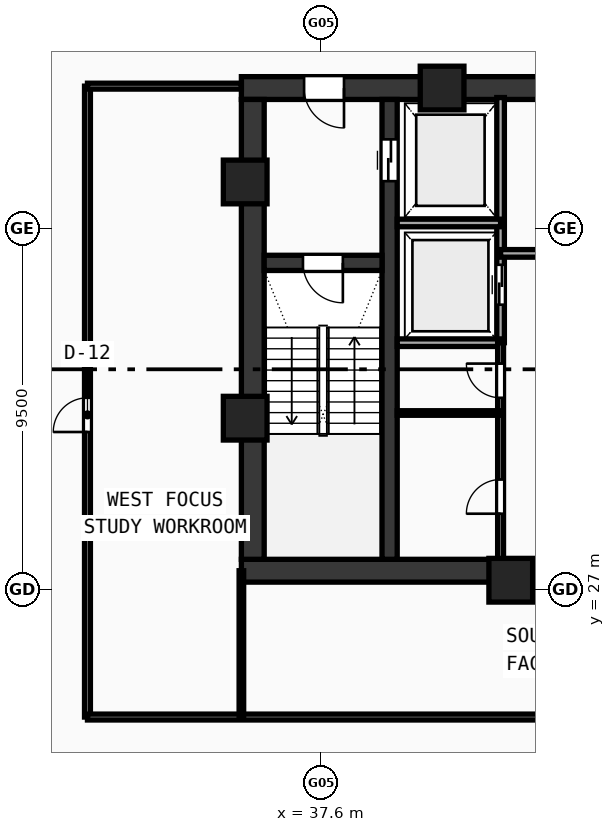
"""IFC4 building model, lengths in metres.
Left out: names, types, materials, properties, quantities, classifications, styles, units other than length and angle.
Written with IfcOpenShell. Run it as: python <this file> out.ifc"""

import sys

from ifc_helpers import new_model, si_unit, direction, frame, frame_2d, origin, origin_with_axes, origin_2d, place, context, subcontext, project, spatial, rectangle, hollow_rectangle, extrude, source, transform, mapped, element, fill, save


model = new_model("IFC4")
c1 = context("Model", 3, precision=1e-05, world=origin(), true_north=direction((0.0, 1.0)))
c2 = subcontext(c1, "Body", "Model", "MODEL_VIEW")
j1 = project(units=[si_unit("LENGTHUNIT", "METRE"), si_unit("PLANEANGLEUNIT", "RADIAN")], contexts=[c1])
p1 = place(None, origin())
s1 = spatial("IfcSite", under=j1, at=p1, CompositionType="ELEMENT")
p2 = place(p1, origin())
s2 = spatial("IfcBuilding", under=s1, at=p2, CompositionType="ELEMENT")
p3 = place(p2, frame((0.0, 0.0, 155.59)))
s3 = spatial("IfcBuildingStorey", under=s2, at=p3, CompositionType="ELEMENT", Elevation=155.59)
p4 = place(p3, frame((35.5, 27.5, 0.0), z_axis=(0.0, 0.0, 1.0), x_axis=(1.0, 0.0, 0.0)))
e1 = element("IfcWall", 1, at=p4, inside=s3, PredefinedType="SHEAR", context=c2, shape_type="SweptSolid", body=[
    extrude(rectangle(XDim=25.0, YDim=0.6, at=frame_2d((12.5, 0.0))), origin(), (0.0, 0.0, 1.0), 3.42),
])
p5 = place(p3, frame((35.5, 40.2, 0.0), z_axis=(0.0, 0.0, 1.0), x_axis=(1.0, 0.0, 0.0)))
e2 = element("IfcWall", 2, at=p5, inside=s3, PredefinedType="SHEAR", context=c2, shape_type="SweptSolid", body=[
    extrude(rectangle(XDim=11.3, YDim=0.6, at=frame_2d((5.65, 0.0))), origin(), (0.0, 0.0, 1.0), 3.42),
])
p6 = place(p5, frame((1.65, 0.0, 0.0)))
e3 = element("IfcOpeningElement", 3, at=p6, cuts=e2, PredefinedType="OPENING", context=c2, shape_type="SweptSolid", body=[
    extrude(rectangle(XDim=1.05, YDim=2.1, at=frame_2d((0.525, 1.05))), frame((0.0, 0.31, 0.0), z_axis=(0.0, -1.0, 0.0), x_axis=(1.0, 0.0, 0.0)), (0.0, 0.0, 1.0), 0.62),
])
p7 = place(p3, frame((35.8, 27.8, 0.0), z_axis=(0.0, 0.0, 1.0), x_axis=(0.0, 1.0, 0.0)))
e4 = element("IfcWall", 4, at=p7, inside=s3, PredefinedType="SHEAR", context=c2, shape_type="SweptSolid", body=[
    extrude(rectangle(XDim=12.1, YDim=0.6, at=frame_2d((6.05, 0.0))), origin(), (0.0, 0.0, 1.0), 3.42),
])
p8 = place(p3, frame((39.4, 27.8, 0.0), z_axis=(0.0, 0.0, 1.0), x_axis=(0.0, 1.0, 0.0)))
e5 = element("IfcWall", 5, at=p8, inside=s3, PredefinedType="SHEAR", context=c2, shape_type="SweptSolid", body=[
    extrude(rectangle(XDim=12.1, YDim=0.4, at=frame_2d((6.05, 0.0))), origin(), (0.0, 0.0, 1.0), 3.42),
])
p9 = place(p8, frame((9.95, 0.0, 0.0)))
e6 = element("IfcOpeningElement", 6, at=p9, cuts=e5, PredefinedType="OPENING", context=c2, shape_type="SweptSolid", body=[
    extrude(rectangle(XDim=1.1, YDim=2.1, at=frame_2d((0.55, 1.05))), frame((0.0, 0.21, 0.0), z_axis=(0.0, -1.0, 0.0), x_axis=(1.0, 0.0, 0.0)), (0.0, 0.0, 1.0), 0.42),
])
p10 = place(p3, frame((36.1, 35.6, 0.0), z_axis=(0.0, 0.0, 1.0), x_axis=(1.0, 0.0, 0.0)))
e7 = element("IfcWall", 7, at=p10, inside=s3, PredefinedType="SHEAR", context=c2, shape_type="SweptSolid", body=[
    extrude(rectangle(XDim=3.1, YDim=0.4, at=frame_2d((1.55, 0.0))), origin(), (0.0, 0.0, 1.0), 3.42),
])
p11 = place(p10, frame((1.02, 0.0, 0.0)))
e8 = element("IfcOpeningElement", 8, at=p11, cuts=e7, PredefinedType="OPENING", context=c2, shape_type="SweptSolid", body=[
    extrude(rectangle(XDim=1.05, YDim=2.1, at=frame_2d((0.525, 1.05))), frame((0.0, 0.21, 0.0), z_axis=(0.0, -1.0, 0.0), x_axis=(1.0, 0.0, 0.0)), (0.0, 0.0, 1.0), 0.42),
])
m1 = source(origin(), c2, "Body", "SweptSolid", [
    extrude(hollow_rectangle(XDim=1.15, YDim=1.15, WallThickness=0.048, at=origin_2d()), origin(), (0.0, 0.0, 1.0), 3.68),
])
for number, where, z_axis, x_axis in (
    (9, (42.588, 27.25, -0.26), (0.0, 0.0, 1.0), (1.0, 0.0, 0.0)),
    (10, (40.781, 40.2, -0.26), (0.0, 0.0, 1.0), (1.0, 0.0, 0.0)),
    (11, (35.6, 37.729, -0.26), (0.0, 0.0, 1.0), (1.0, 0.0, 0.0)),
    (12, (35.6, 31.513, -0.26), (0.0, 0.0, 1.0), (1.0, 0.0, 0.0)),
):
    element("IfcColumn", number, at=place(p3, frame(where, z_axis=z_axis, x_axis=x_axis)), inside=s3, PredefinedType="COLUMN", context=c2, shape_type="MappedRepresentation", body=[
        mapped(m1, transform((0.0, 0.0, 0.0), scale=1.0)),
    ])
p12 = place(p3, frame((42.32, 33.5, 0.0), z_axis=(0.0, 0.0, 1.0), x_axis=(0.0, 1.0, 0.0)))
e13 = element("IfcWall", 13, at=p12, inside=s3, PredefinedType="SOLIDWALL", context=c2, shape_type="SweptSolid", body=[
    extrude(rectangle(XDim=6.45, YDim=0.2, at=frame_2d((3.225, 0.0))), origin(), (0.0, 0.0, 1.0), 3.42),
])
p13 = place(p12, frame((1.0, 0.0, 0.0)))
e14 = element("IfcOpeningElement", 14, at=p13, cuts=e13, PredefinedType="OPENING", context=c2, shape_type="SweptSolid", body=[
    extrude(rectangle(XDim=1.05, YDim=2.1, at=frame_2d((0.525, 1.05))), frame((0.0, 0.11, 0.0), z_axis=(0.0, -1.0, 0.0), x_axis=(1.0, 0.0, 0.0)), (0.0, 0.0, 1.0), 0.22),
])
for number, where, z_axis, x_axis in (
    (15, (39.6, 36.65, 0.0), (0.0, 0.0, 1.0), (1.0, 0.0, 0.0)),
    (16, (39.6, 33.5, 0.0), (0.0, 0.0, 1.0), (1.0, 0.0, 0.0)),
):
    element("IfcWall", number, at=place(p3, frame(where, z_axis=z_axis, x_axis=x_axis)), inside=s3, PredefinedType="SOLIDWALL", context=c2, shape_type="SweptSolid", body=[
        extrude(rectangle(XDim=2.72, YDim=0.2, at=frame_2d((1.36, 0.0))), origin(), (0.0, 0.0, 1.0), 3.42),
    ])
p14 = place(p3, frame((42.32, 35.85, 0.0), z_axis=(0.0, 0.0, 1.0), x_axis=(1.0, 0.0, 0.0)))
e17 = element("IfcWall", 17, at=p14, inside=s3, PredefinedType="SOLIDWALL", context=c2, shape_type="SweptSolid", body=[
    extrude(rectangle(XDim=4.73, YDim=0.2, at=frame_2d((2.365, 0.0))), origin(), (0.0, 0.0, 1.0), 3.42),
])
p15 = place(p14, frame((1.8, 0.0, 0.0)))
e18 = element("IfcOpeningElement", 18, at=p15, cuts=e17, PredefinedType="OPENING", context=c2, shape_type="SweptSolid", body=[
    extrude(rectangle(XDim=0.9, YDim=2.1, at=frame_2d((0.45, 1.05))), frame((0.0, 0.11, 0.0), z_axis=(0.0, -1.0, 0.0), x_axis=(1.0, 0.0, 0.0)), (0.0, 0.0, 1.0), 0.22),
])
p16 = place(p3, frame((42.32, 27.6, 0.0), z_axis=(0.0, 0.0, 1.0), x_axis=(0.0, 1.0, 0.0)))
e19 = element("IfcWall", 19, at=p16, inside=s3, PredefinedType="PARTITIONING", context=c2, shape_type="SweptSolid", body=[
    extrude(rectangle(XDim=5.9, YDim=0.155, at=frame_2d((2.95, 0.0))), origin(), (0.0, 0.0, 1.0), 3.42),
])
p17 = place(p16, frame((1.4, 0.0, 0.0)))
e20 = element("IfcOpeningElement", 20, at=p17, cuts=e19, PredefinedType="OPENING", context=c2, shape_type="SweptSolid", body=[
    extrude(rectangle(XDim=0.9, YDim=2.1, at=frame_2d((0.45, 1.05))), frame((0.0, 0.087, 0.0), z_axis=(0.0, -1.0, 0.0), x_axis=(1.0, 0.0, 0.0)), (0.0, 0.0, 1.0), 0.175),
])
p18 = place(p16, frame((4.45, 0.0, 0.0)))
e21 = element("IfcOpeningElement", 21, at=p18, cuts=e19, PredefinedType="OPENING", context=c2, shape_type="SweptSolid", body=[
    extrude(rectangle(XDim=0.9, YDim=2.1, at=frame_2d((0.45, 1.05))), frame((0.0, 0.087, 0.0), z_axis=(0.0, -1.0, 0.0), x_axis=(1.0, 0.0, 0.0)), (0.0, 0.0, 1.0), 0.175),
])
p19 = place(p3, frame((39.6, 31.65, 0.0), z_axis=(0.0, 0.0, 1.0), x_axis=(1.0, 0.0, 0.0)))
e22 = element("IfcWall", 22, at=p19, inside=s3, PredefinedType="PARTITIONING", context=c2, shape_type="SweptSolid", body=[
    extrude(rectangle(XDim=2.72, YDim=0.12, at=frame_2d((1.36, 0.0))), origin(), (0.0, 0.0, 1.0), 3.42),
])
p20 = place(p3, frame((31.45, 23.65, 0.0), z_axis=(0.0, 0.0, 1.0), x_axis=(0.0, 1.0, 0.0)))
e23 = element("IfcWall", 23, at=p20, inside=s3, PredefinedType="PARTITIONING", context=c2, shape_type="SweptSolid", body=[
    extrude(rectangle(XDim=16.6, YDim=0.155, at=frame_2d((8.3, 0.0))), origin(), (0.0, 0.0, 1.0), 2.77),
])
p21 = place(p20, frame((7.5, 0.0, 0.0)))
e24 = element("IfcOpeningElement", 24, at=p21, cuts=e23, PredefinedType="OPENING", context=c2, shape_type="SweptSolid", body=[
    extrude(rectangle(XDim=0.9, YDim=2.08, at=frame_2d((0.45, 1.04))), frame((0.0, 0.087, 0.0), z_axis=(0.0, -1.0, 0.0), x_axis=(1.0, 0.0, 0.0)), (0.0, 0.0, 1.0), 0.175),
])
p22 = place(p3, frame((31.45, 23.65, 0.0), z_axis=(0.0, 0.0, 1.0), x_axis=(1.0, 0.0, 0.0)))
e25 = element("IfcWall", 25, at=p22, inside=s3, PredefinedType="PARTITIONING", context=c2, shape_type="SweptSolid", body=[
    extrude(rectangle(XDim=33.1, YDim=0.155, at=frame_2d((16.55, 0.0))), origin(), (0.0, 0.0, 1.0), 2.77),
])
p23 = place(p22, frame((16.0, 0.0, 0.0)))
e26 = element("IfcOpeningElement", 26, at=p23, cuts=e25, PredefinedType="OPENING", context=c2, shape_type="SweptSolid", body=[
    extrude(rectangle(XDim=0.92, YDim=2.1, at=frame_2d((0.46, 1.05))), frame((0.0, 0.087, 0.0), z_axis=(0.0, -1.0, 0.0), x_axis=(1.0, 0.0, 0.0)), (0.0, 0.0, 1.0), 0.175),
])
p24 = place(p3, frame((31.45, 40.25, 0.0), z_axis=(0.0, 0.0, 1.0), x_axis=(1.0, 0.0, 0.0)))
e27 = element("IfcWall", 27, at=p24, inside=s3, PredefinedType="PARTITIONING", context=c2, shape_type="SweptSolid", body=[
    extrude(rectangle(XDim=4.05, YDim=0.155, at=frame_2d((2.025, 0.0))), origin(), (0.0, 0.0, 1.0), 3.42),
])
p25 = place(p3, frame((35.5, 23.65, 0.0), z_axis=(0.0, 0.0, 1.0), x_axis=(0.0, 1.0, 0.0)))
e28 = element("IfcWall", 28, at=p25, inside=s3, PredefinedType="PARTITIONING", context=c2, shape_type="SweptSolid", body=[
    extrude(rectangle(XDim=3.85, YDim=0.12, at=frame_2d((1.925, 0.0))), origin(), (0.0, 0.0, 1.0), 3.02),
])
m2 = source(origin(), c2, "Body", "SweptSolid", [
    extrude(rectangle(XDim=1.05, YDim=2.1, at=frame_2d((0.525, 1.05))), frame((0.0, 0.025, 0.0), z_axis=(0.0, -1.0, 0.0), x_axis=(1.0, 0.0, 0.0)), (0.0, 0.0, 1.0), 0.05),
])
p26 = place(p11, frame((1.05, 0.0, 0.0), z_axis=(0.0, 0.0, 1.0), x_axis=(-1.0, 0.0, 0.0)))
e29 = element("IfcDoor", 29, at=p26, inside=s3, OperationType="SINGLE_SWING_LEFT", PredefinedType="DOOR", context=c2, shape_type="MappedRepresentation", body=[
    mapped(m2, transform((0.0, 0.0, 0.0), scale=1.0)),
])
fill(e8, e29)
p27 = place(p6, frame((1.05, 0.0, 0.0), z_axis=(0.0, 0.0, 1.0), x_axis=(-1.0, 0.0, 0.0)))
e30 = element("IfcDoor", 30, at=p27, inside=s3, OperationType="SINGLE_SWING_LEFT", PredefinedType="DOOR", context=c2, shape_type="MappedRepresentation", body=[
    mapped(m2, transform((0.0, 0.0, 0.0), scale=1.0)),
])
fill(e3, e30)
m3 = source(origin(), c2, "Body", "SweptSolid", [
    extrude(rectangle(XDim=1.1, YDim=2.1, at=frame_2d((0.55, 1.05))), frame((0.0, 0.025, 0.0), z_axis=(0.0, -1.0, 0.0), x_axis=(1.0, 0.0, 0.0)), (0.0, 0.0, 1.0), 0.05),
])
p28 = place(p9, frame((1.1, 0.0, 0.0), z_axis=(0.0, 0.0, 1.0), x_axis=(-1.0, 0.0, 0.0)))
e31 = element("IfcDoor", 31, at=p28, inside=s3, OperationType="DOUBLE_DOOR_SLIDING", PredefinedType="DOOR", context=c2, shape_type="MappedRepresentation", body=[
    mapped(m3, transform((0.0, 0.0, 0.0), scale=1.0)),
])
fill(e6, e31)
p29 = place(p13, origin_with_axes())
e32 = element("IfcDoor", 32, at=p29, inside=s3, OperationType="DOUBLE_DOOR_SLIDING", PredefinedType="DOOR", context=c2, shape_type="MappedRepresentation", body=[
    mapped(m2, transform((0.0, 0.0, 0.0), scale=1.0)),
])
fill(e14, e32)
m4 = source(origin(), c2, "Body", "SweptSolid", [
    extrude(rectangle(XDim=0.9, YDim=2.1, at=frame_2d((0.45, 1.05))), frame((0.0, 0.025, 0.0), z_axis=(0.0, -1.0, 0.0), x_axis=(1.0, 0.0, 0.0)), (0.0, 0.0, 1.0), 0.05),
])
p30 = place(p17, origin_with_axes())
e33 = element("IfcDoor", 33, at=p30, inside=s3, OperationType="SINGLE_SWING_LEFT", PredefinedType="DOOR", context=c2, shape_type="MappedRepresentation", body=[
    mapped(m4, transform((0.0, 0.0, 0.0), scale=1.0)),
])
fill(e20, e33)
p31 = place(p18, origin_with_axes())
e34 = element("IfcDoor", 34, at=p31, inside=s3, OperationType="SINGLE_SWING_RIGHT", PredefinedType="DOOR", context=c2, shape_type="MappedRepresentation", body=[
    mapped(m4, transform((0.0, 0.0, 0.0), scale=1.0)),
])
fill(e21, e34)
m5 = source(origin(), c2, "Body", "SweptSolid", [
    extrude(rectangle(XDim=0.9, YDim=2.08, at=frame_2d((0.45, 1.04))), frame((0.0, 0.025, 0.0), z_axis=(0.0, -1.0, 0.0), x_axis=(1.0, 0.0, 0.0)), (0.0, 0.0, 1.0), 0.05),
])
p32 = place(p21, origin_with_axes())
e35 = element("IfcDoor", 35, at=p32, inside=s3, OperationType="SINGLE_SWING_LEFT", PredefinedType="DOOR", context=c2, shape_type="MappedRepresentation", body=[
    mapped(m5, transform((0.0, 0.0, 0.0), scale=1.0)),
])
fill(e24, e35)
save(model, sys.argv[1])
